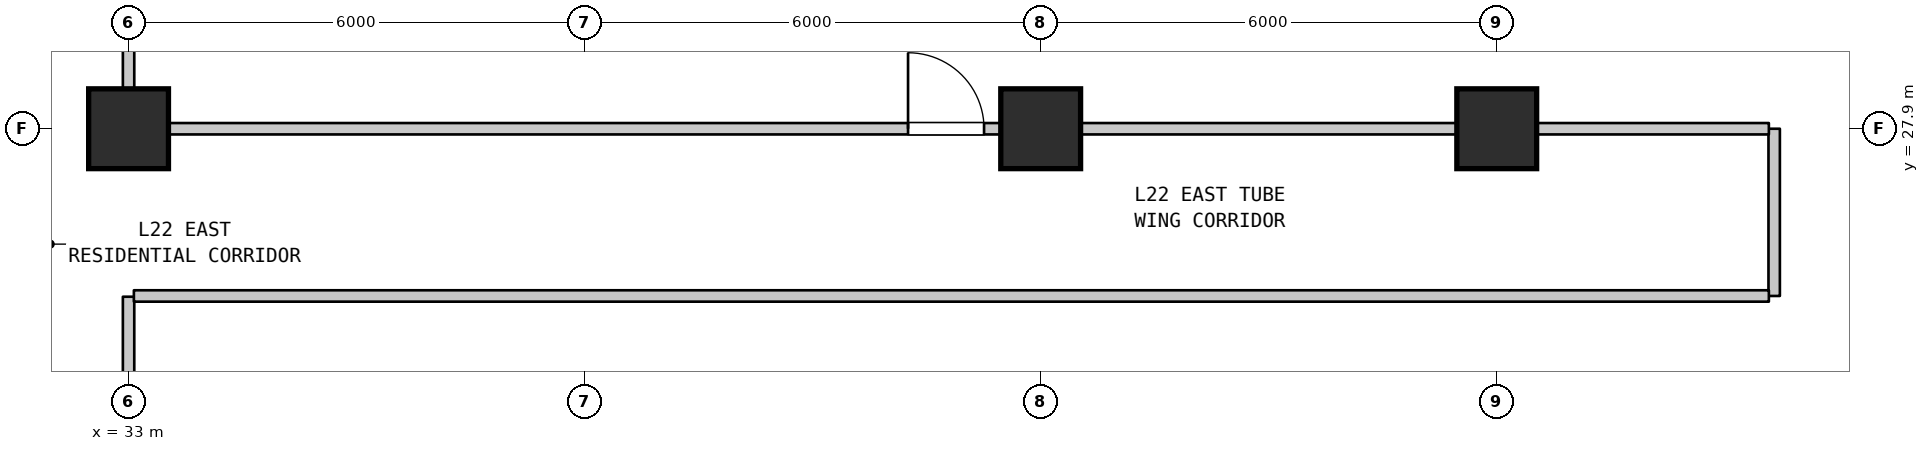
"""IFC4 building model, lengths in metres.
Left out: names, types, materials, properties, quantities, classifications, styles, units other than length and angle.
Written with IfcOpenShell. Run it as: python <this file> out.ifc"""

import sys

from ifc_helpers import new_model, si_unit, direction, frame, frame_2d, origin, origin_2d, place, context, subcontext, project, spatial, rectangle, extrude, element, fill, save


model = new_model("IFC4")
c1 = context("Model", 3, precision=1e-05, world=origin(), true_north=direction((0.0, 1.0)))
c2 = subcontext(c1, "Body", "Model", "MODEL_VIEW")
j1 = project(units=[si_unit("LENGTHUNIT", "METRE"), si_unit("PLANEANGLEUNIT", "RADIAN")], contexts=[c1])
p1 = place(None, origin())
s1 = spatial("IfcSite", under=j1, at=p1, CompositionType="ELEMENT")
p2 = place(p1, origin())
s2 = spatial("IfcBuilding", under=s1, at=p2, CompositionType="ELEMENT")
p3 = place(p2, frame((0.0, 0.0, 94.6)))
s3 = spatial("IfcBuildingStorey", under=s2, at=p3, CompositionType="ELEMENT", Elevation=94.6)
for number, where, z_axis, x_axis in (
    (1, (33.0, 27.9, 0.0), (0.0, 0.0, 1.0), (1.0, 0.0, 0.0)),
    (2, (45.0, 27.9, 0.0), (0.0, 0.0, 1.0), (1.0, 0.0, 0.0)),
    (3, (51.0, 27.9, 0.0), (0.0, 0.0, 1.0), (1.0, 0.0, 0.0)),
):
    element("IfcColumn", number, at=place(p3, frame(where, z_axis=z_axis, x_axis=x_axis)), inside=s3, PredefinedType="COLUMN", context=c2, shape_type="SweptSolid", body=[
        extrude(rectangle(XDim=1.05, YDim=1.05, at=origin_2d()), origin(), (0.0, 0.0, 1.0), 3.7),
    ])
p4 = place(p3, frame((33.0, 19.51, 0.0), z_axis=(0.0, 0.0, 1.0), x_axis=(0.0, 1.0, 0.0)))
e4 = element("IfcWall", 4, at=p4, inside=s3, PredefinedType="STANDARD", context=c2, shape_type="SweptSolid", body=[
    extrude(rectangle(XDim=6.18, YDim=0.15, at=frame_2d((3.09, 0.0))), origin(), (0.0, 0.0, 1.0), 2.935),
])
p5 = place(p3, frame((33.0, 27.91, 0.0), z_axis=(0.0, 0.0, 1.0), x_axis=(0.0, 1.0, 0.0)))
e5 = element("IfcWall", 5, at=p5, inside=s3, PredefinedType="STANDARD", context=c2, shape_type="SweptSolid", body=[
    extrude(rectangle(XDim=9.98, YDim=0.15, at=frame_2d((4.99, 0.0))), origin(), (0.0, 0.0, 1.0), 2.885),
])
p6 = place(p3, frame((54.65, 25.7, 0.0), z_axis=(0.0, 0.0, 1.0), x_axis=(0.0, 1.0, 0.0)))
e6 = element("IfcWall", 6, at=p6, inside=s3, PredefinedType="STANDARD", context=c2, shape_type="SweptSolid", body=[
    extrude(rectangle(XDim=2.2, YDim=0.15, at=frame_2d((1.1, 0.0))), origin(), (0.0, 0.0, 1.0), 3.385),
])
p7 = place(p3, frame((33.07, 25.7, 0.0), z_axis=(0.0, 0.0, 1.0), x_axis=(1.0, 0.0, 0.0)))
e7 = element("IfcWall", 7, at=p7, inside=s3, PredefinedType="STANDARD", context=c2, shape_type="SweptSolid", body=[
    extrude(rectangle(XDim=21.51, YDim=0.15, at=frame_2d((10.755, 0.0))), origin(), (0.0, 0.0, 1.0), 3.385),
])
p8 = place(p3, frame((33.07, 27.9, 0.0), z_axis=(0.0, 0.0, 1.0), x_axis=(1.0, 0.0, 0.0)))
e8 = element("IfcWall", 8, at=p8, inside=s3, PredefinedType="STANDARD", context=c2, shape_type="SweptSolid", body=[
    extrude(rectangle(XDim=11.93, YDim=0.15, at=frame_2d((5.965, 0.0))), origin(), (0.0, 0.0, 1.0), 2.885),
])
p9 = place(p8, frame((10.185, 0.0, 0.0)))
e9 = element("IfcOpeningElement", 9, at=p9, cuts=e8, PredefinedType="OPENING", context=c2, shape_type="SweptSolid", body=[
    extrude(rectangle(XDim=1.0, YDim=2.15, at=frame_2d((0.5, 1.075))), frame((0.0, 0.085, 0.0), z_axis=(0.0, -1.0, 0.0), x_axis=(1.0, 0.0, 0.0)), (0.0, 0.0, 1.0), 0.17),
])
p10 = place(p3, frame((45.0, 27.9, 0.0), z_axis=(0.0, 0.0, 1.0), x_axis=(1.0, 0.0, 0.0)))
e10 = element("IfcWall", 10, at=p10, inside=s3, PredefinedType="STANDARD", context=c2, shape_type="SweptSolid", body=[
    extrude(rectangle(XDim=9.58, YDim=0.15, at=frame_2d((4.79, 0.0))), origin(), (0.0, 0.0, 1.0), 2.935),
])
p11 = place(p9, origin())
e11 = element("IfcDoor", 11, at=p11, inside=s3, OperationType="SINGLE_SWING_LEFT", PredefinedType="DOOR", context=c2, shape_type="SweptSolid", body=[
    extrude(rectangle(XDim=1.0, YDim=2.15, at=frame_2d((0.5, 1.075))), frame((0.0, 0.025, 0.0), z_axis=(0.0, -1.0, 0.0), x_axis=(1.0, 0.0, 0.0)), (0.0, 0.0, 1.0), 0.05),
])
fill(e9, e11)
save(model, sys.argv[1])
